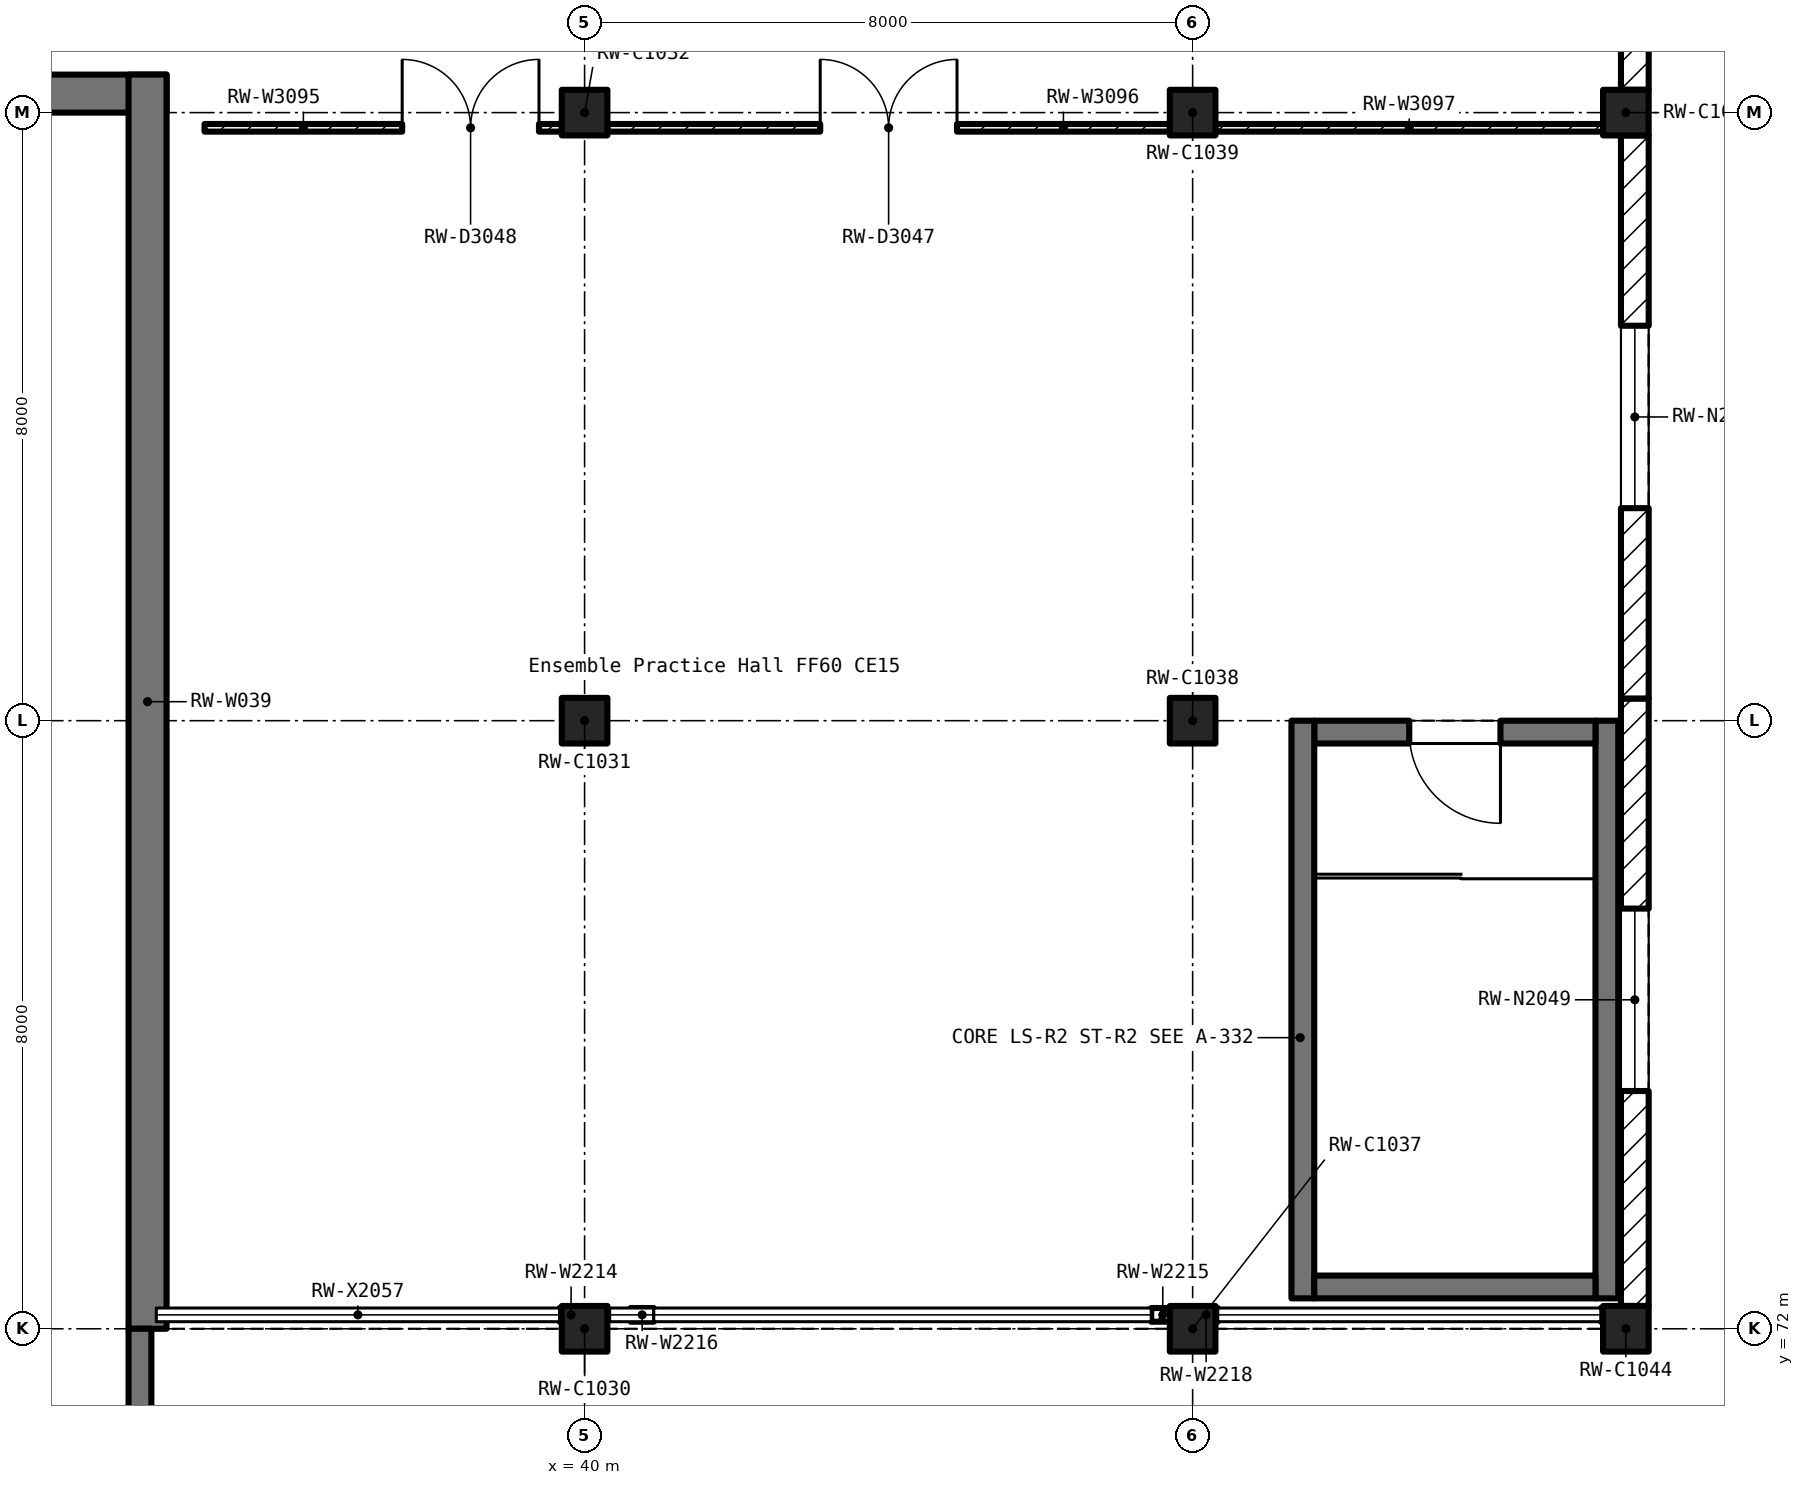
"""IFC4 building model, lengths in metres.
Left out: names, types, materials, properties, quantities, classifications, styles, units other than length and angle.
Written with IfcOpenShell. Run it as: python <this file> out.ifc"""

import sys

from ifc_helpers import new_model, si_unit, direction, frame, frame_2d, origin, origin_2d, place, context, subcontext, project, spatial, polyline, rectangle, outline, extrude, element, fill, save


model = new_model("IFC4")
c1 = context("Model", 3, precision=1e-05, world=origin(), true_north=direction((0.0, 1.0)))
c2 = subcontext(c1, "Body", "Model", "MODEL_VIEW")
j1 = project(units=[si_unit("LENGTHUNIT", "METRE"), si_unit("PLANEANGLEUNIT", "RADIAN")], contexts=[c1])
p1 = place(None, origin())
s1 = spatial("IfcSite", under=j1, at=p1, CompositionType="ELEMENT")
p2 = place(p1, origin())
s2 = spatial("IfcBuilding", under=s1, at=p2, CompositionType="ELEMENT")
p3 = place(p2, frame((0.0, 0.0, 22.5)))
s3 = spatial("IfcBuildingStorey", under=s2, at=p3, CompositionType="ELEMENT", Elevation=22.5)
for number, where, z_axis, x_axis in (
    (1, (40.0, 72.0, 0.0), (0.0, 0.0, 1.0), (1.0, 0.0, 0.0)),
    (2, (40.0, 80.0, 0.0), (0.0, 0.0, 1.0), (1.0, 0.0, 0.0)),
    (3, (40.0, 88.0, 0.0), (0.0, 0.0, 1.0), (1.0, 0.0, 0.0)),
    (4, (48.0, 72.0, 0.0), (0.0, 0.0, 1.0), (1.0, 0.0, 0.0)),
    (5, (48.0, 80.0, 0.0), (0.0, 0.0, 1.0), (1.0, 0.0, 0.0)),
    (6, (48.0, 88.0, 0.0), (0.0, 0.0, 1.0), (1.0, 0.0, 0.0)),
    (7, (53.7, 72.0, 0.0), (0.0, 0.0, 1.0), (1.0, 0.0, 0.0)),
    (8, (53.7, 88.0, 0.0), (0.0, 0.0, 1.0), (1.0, 0.0, 0.0)),
):
    element("IfcColumn", number, at=place(p3, frame(where, z_axis=z_axis, x_axis=x_axis)), inside=s3, PredefinedType="COLUMN", context=c2, shape_type="SweptSolid", body=[
        extrude(rectangle(XDim=0.6, YDim=0.6, at=origin_2d()), origin(), (0.0, 0.0, 1.0), 5.5),
    ])
p4 = place(p3, frame((9.56, 88.25, 0.0), z_axis=(0.0, 0.0, 1.0), x_axis=(1.0, 0.0, 0.0)))
e9 = element("IfcWall", 9, at=p4, inside=s3, PredefinedType="SHEAR", context=c2, shape_type="SweptSolid", body=[
    extrude(rectangle(XDim=24.94, YDim=0.5, at=frame_2d((12.47, 0.0))), origin(), (0.0, 0.0, 1.0), 5.25),
])
p5 = place(p3, frame((34.25, 72.0, 0.0), z_axis=(0.0, 0.0, 1.0), x_axis=(0.0, 1.0, 0.0)))
e10 = element("IfcWall", 10, at=p5, inside=s3, PredefinedType="SHEAR", context=c2, shape_type="SweptSolid", body=[
    extrude(outline(polyline([(0.0, 0.0), (16.5, 0.0), (16.5, 5.25), (0.001, 5.25), (0.0, 0.0), (0.0, 0.0)])), frame((0.0, 0.25, 0.0), z_axis=(0.0, -1.0, 0.0), x_axis=(1.0, 0.0, 0.0)), (0.0, 0.0, 1.0), 0.5),
])
p6 = place(p3, frame((53.818, 72.3, 0.0), z_axis=(0.0, 0.0, 1.0), x_axis=(0.0, 1.0, 0.0)))
e11 = element("IfcWall", 11, at=p6, inside=s3, PredefinedType="SOLIDWALL", context=c2, shape_type="SweptSolid", body=[
    extrude(rectangle(XDim=7.992, YDim=0.365, at=frame_2d((3.996, 0.0))), origin(), (0.0, 0.0, 1.0), 4.45),
])
p7 = place(p6, frame((2.828, 0.0, 1.0)))
e12 = element("IfcOpeningElement", 12, at=p7, cuts=e11, PredefinedType="OPENING", context=c2, shape_type="SweptSolid", body=[
    extrude(rectangle(XDim=2.4, YDim=2.0, at=frame_2d((1.2, 1.0))), frame((0.0, 0.195, 0.0), z_axis=(0.0, -1.0, 0.0), x_axis=(1.0, 0.0, 0.0)), (0.0, 0.0, 1.0), 0.389),
])
p8 = place(p3, frame((53.818, 80.292, 0.0), z_axis=(0.0, 0.0, 1.0), x_axis=(0.0, 1.0, 0.0)))
e13 = element("IfcWall", 13, at=p8, inside=s3, PredefinedType="SOLIDWALL", context=c2, shape_type="SweptSolid", body=[
    extrude(rectangle(XDim=7.408, YDim=0.365, at=frame_2d((3.704, 0.0))), origin(), (0.0, 0.0, 1.0), 4.45),
])
p9 = place(p8, frame((2.504, 0.0, 1.0)))
e14 = element("IfcOpeningElement", 14, at=p9, cuts=e13, PredefinedType="OPENING", context=c2, shape_type="SweptSolid", body=[
    extrude(rectangle(XDim=2.4, YDim=2.0, at=frame_2d((1.2, 1.0))), frame((0.0, 0.195, 0.0), z_axis=(0.0, -1.0, 0.0), x_axis=(1.0, 0.0, 0.0)), (0.0, 0.0, 1.0), 0.389),
])
p10 = place(p3, frame((53.818, 88.3, 0.0), z_axis=(0.0, 0.0, 1.0), x_axis=(0.0, 1.0, 0.0)))
e15 = element("IfcWall", 15, at=p10, inside=s3, PredefinedType="SOLIDWALL", context=c2, shape_type="SweptSolid", body=[
    extrude(rectangle(XDim=7.4, YDim=0.365, at=frame_2d((3.7, 0.0))), origin(), (0.0, 0.0, 1.0), 4.45),
])
p11 = place(p10, frame((2.5, 0.0, 1.0)))
e16 = element("IfcOpeningElement", 16, at=p11, cuts=e15, PredefinedType="OPENING", context=c2, shape_type="SweptSolid", body=[
    extrude(rectangle(XDim=2.4, YDim=2.0, at=frame_2d((1.2, 1.0))), frame((0.0, 0.195, 0.0), z_axis=(0.0, -1.0, 0.0), x_axis=(1.0, 0.0, 0.0)), (0.0, 0.0, 1.0), 0.389),
])
p12 = place(p3, frame((53.85, 64.3, 0.0), z_axis=(0.0, 0.0, 1.0), x_axis=(0.0, 1.0, 0.0)))
e17 = element("IfcWall", 17, at=p12, inside=s3, PredefinedType="PARAPET", context=c2, shape_type="SweptSolid", body=[
    extrude(rectangle(XDim=7.68, YDim=0.3, at=frame_2d((3.84, 0.0))), origin(), (0.0, 0.0, 1.0), 1.1),
])
p13 = place(p3, frame((53.45, 72.4, 0.0), z_axis=(0.0, 0.0, 1.0), x_axis=(0.0, 1.0, 0.0)))
e18 = element("IfcWall", 18, at=p13, inside=s3, PredefinedType="SOLIDWALL", context=c2, shape_type="SweptSolid", body=[
    extrude(rectangle(XDim=7.6, YDim=0.3, at=frame_2d((3.8, 0.0))), origin(), (0.0, 0.0, 1.0), 5.25),
])
p14 = place(p3, frame((53.3, 79.85, 0.0), z_axis=(0.0, 0.0, 1.0), x_axis=(-1.0, 0.0, 0.0)))
e19 = element("IfcWall", 19, at=p14, inside=s3, PredefinedType="SOLIDWALL", context=c2, shape_type="SweptSolid", body=[
    extrude(rectangle(XDim=3.7, YDim=0.3, at=frame_2d((1.85, 0.0))), origin(), (0.0, 0.0, 1.0), 5.25),
])
p15 = place(p14, frame((1.25, 0.0, 0.0)))
e20 = element("IfcOpeningElement", 20, at=p15, cuts=e19, PredefinedType="OPENING", context=c2, shape_type="SweptSolid", body=[
    extrude(rectangle(XDim=1.2, YDim=2.1, at=frame_2d((0.6, 1.05))), frame((0.0, 0.162, 0.0), z_axis=(0.0, -1.0, 0.0), x_axis=(1.0, 0.0, 0.0)), (0.0, 0.0, 1.0), 0.324),
])
p16 = place(p3, frame((49.45, 80.0, 0.0), z_axis=(0.0, 0.0, 1.0), x_axis=(0.0, -1.0, 0.0)))
e21 = element("IfcWall", 21, at=p16, inside=s3, PredefinedType="SOLIDWALL", context=c2, shape_type="SweptSolid", body=[
    extrude(rectangle(XDim=7.6, YDim=0.3, at=frame_2d((3.8, 0.0))), origin(), (0.0, 0.0, 1.0), 5.25),
])
p17 = place(p3, frame((49.6, 72.55, 0.0), z_axis=(0.0, 0.0, 1.0), x_axis=(1.0, 0.0, 0.0)))
e22 = element("IfcWall", 22, at=p17, inside=s3, PredefinedType="SOLIDWALL", context=c2, shape_type="SweptSolid", body=[
    extrude(rectangle(XDim=3.7, YDim=0.3, at=frame_2d((1.85, 0.0))), origin(), (0.0, 0.0, 1.0), 5.25),
])
p18 = place(p3, frame((35.0, 87.8, 0.0), z_axis=(0.0, 0.0, 1.0), x_axis=(1.0, 0.0, 0.0)))
e23 = element("IfcWall", 23, at=p18, inside=s3, PredefinedType="PARTITIONING", context=c2, shape_type="SweptSolid", body=[
    extrude(rectangle(XDim=4.7, YDim=0.1, at=frame_2d((2.35, 0.0))), origin(), (0.0, 0.0, 1.0), 4.35),
])
p19 = place(p18, frame((2.6, 0.0, 0.0)))
e24 = element("IfcOpeningElement", 24, at=p19, cuts=e23, PredefinedType="OPENING", context=c2, shape_type="SweptSolid", body=[
    extrude(rectangle(XDim=1.8, YDim=2.1, at=frame_2d((0.9, 1.05))), frame((0.0, 0.062, 0.0), z_axis=(0.0, -1.0, 0.0), x_axis=(1.0, 0.0, 0.0)), (0.0, 0.0, 1.0), 0.124),
])
p20 = place(p3, frame((40.3, 87.8, 0.0), z_axis=(0.0, 0.0, 1.0), x_axis=(1.0, 0.0, 0.0)))
e25 = element("IfcWall", 25, at=p20, inside=s3, PredefinedType="PARTITIONING", context=c2, shape_type="SweptSolid", body=[
    extrude(rectangle(XDim=7.4, YDim=0.1, at=frame_2d((3.7, 0.0))), origin(), (0.0, 0.0, 1.0), 4.35),
])
p21 = place(p20, frame((2.8, 0.0, 0.0)))
e26 = element("IfcOpeningElement", 26, at=p21, cuts=e25, PredefinedType="OPENING", context=c2, shape_type="SweptSolid", body=[
    extrude(rectangle(XDim=1.8, YDim=2.1, at=frame_2d((0.9, 1.05))), frame((0.0, 0.062, 0.0), z_axis=(0.0, -1.0, 0.0), x_axis=(1.0, 0.0, 0.0)), (0.0, 0.0, 1.0), 0.124),
])
p22 = place(p3, frame((48.3, 87.8, 0.0), z_axis=(0.0, 0.0, 1.0), x_axis=(1.0, 0.0, 0.0)))
e27 = element("IfcWall", 27, at=p22, inside=s3, PredefinedType="PARTITIONING", context=c2, shape_type="SweptSolid", body=[
    extrude(rectangle(XDim=5.1, YDim=0.1, at=frame_2d((2.55, 0.0))), origin(), (0.0, 0.0, 1.0), 4.35),
])
p23 = place(p3, frame((39.67, 72.183, 0.0), z_axis=(0.0, 0.0, 1.0), x_axis=(1.0, 0.0, 0.0)))
e28 = element("IfcWall", 28, at=p23, inside=s3, PredefinedType="SOLIDWALL", context=c2, shape_type="SweptSolid", body=[
    extrude(rectangle(XDim=0.305, YDim=0.18, at=frame_2d((0.153, 0.0))), origin(), (0.0, 0.0, 1.0), 4.4),
])
for number, where, z_axis, x_axis in (
    (29, (47.455, 72.183, 0.0), (0.0, 0.0, 1.0), (1.0, 0.0, 0.0)),
    (30, (40.91, 72.183, 0.0), (0.0, 0.0, 1.0), (-1.0, 0.0, 0.0)),
    (31, (53.37, 72.183, 0.0), (0.0, 0.0, 1.0), (1.0, 0.0, 0.0)),
):
    element("IfcWall", number, at=place(p3, frame(where, z_axis=z_axis, x_axis=x_axis)), inside=s3, PredefinedType="SOLIDWALL", context=c2, shape_type="SweptSolid", body=[
        extrude(rectangle(XDim=0.305, YDim=0.18, at=frame_2d((0.152, 0.0))), origin(), (0.0, 0.0, 1.0), 3.6),
    ])
p24 = place(p3, frame((48.33, 72.183, 0.0), z_axis=(0.0, 0.0, 1.0), x_axis=(-1.0, 0.0, 0.0)))
e32 = element("IfcWall", 32, at=p24, inside=s3, PredefinedType="SOLIDWALL", context=c2, shape_type="SweptSolid", body=[
    extrude(rectangle(XDim=0.305, YDim=0.18, at=frame_2d((0.153, 0.0))), origin(), (0.0, 0.0, 1.0), 3.6),
])
p25 = place(p3, frame((34.15, 65.7, 0.0), z_axis=(0.0, 0.0, 1.0), x_axis=(0.0, 1.0, 0.0)))
e33 = element("IfcWall", 33, at=p25, inside=s3, PredefinedType="SHEAR", context=c2, shape_type="SweptSolid", body=[
    extrude(rectangle(XDim=6.3, YDim=0.3, at=frame_2d((3.15, 0.0))), origin(), (0.0, 0.0, 1.0), 5.5),
])
p26 = place(p7, origin())
e34 = element("IfcWindow", 34, at=p26, inside=s3, PartitioningType="DOUBLE_PANEL_VERTICAL", PredefinedType="WINDOW", context=c2, shape_type="SweptSolid", body=[
    extrude(rectangle(XDim=2.4, YDim=2.0, at=frame_2d((1.2, 1.0))), frame((0.0, 0.03, 0.0), z_axis=(0.0, -1.0, 0.0), x_axis=(1.0, 0.0, 0.0)), (0.0, 0.0, 1.0), 0.06),
])
fill(e12, e34)
p27 = place(p9, origin())
e35 = element("IfcWindow", 35, at=p27, inside=s3, PartitioningType="DOUBLE_PANEL_VERTICAL", PredefinedType="WINDOW", context=c2, shape_type="SweptSolid", body=[
    extrude(rectangle(XDim=2.4, YDim=2.0, at=frame_2d((1.2, 1.0))), frame((0.0, 0.03, 0.0), z_axis=(0.0, -1.0, 0.0), x_axis=(1.0, 0.0, 0.0)), (0.0, 0.0, 1.0), 0.06),
])
fill(e14, e35)
p28 = place(p15, origin())
e36 = element("IfcDoor", 36, at=p28, inside=s3, OperationType="SINGLE_SWING_LEFT", PredefinedType="DOOR", context=c2, shape_type="SweptSolid", body=[
    extrude(rectangle(XDim=1.2, YDim=2.1, at=frame_2d((0.6, 1.05))), frame((0.0, 0.025, 0.0), z_axis=(0.0, -1.0, 0.0), x_axis=(1.0, 0.0, 0.0)), (0.0, 0.0, 1.0), 0.05),
])
fill(e20, e36)
p29 = place(p21, origin())
e37 = element("IfcDoor", 37, at=p29, inside=s3, OperationType="DOUBLE_DOOR_SINGLE_SWING", PredefinedType="DOOR", context=c2, shape_type="SweptSolid", body=[
    extrude(rectangle(XDim=1.8, YDim=2.1, at=frame_2d((0.9, 1.05))), frame((0.0, 0.025, 0.0), z_axis=(0.0, -1.0, 0.0), x_axis=(1.0, 0.0, 0.0)), (0.0, 0.0, 1.0), 0.05),
])
fill(e26, e37)
p30 = place(p19, origin())
e38 = element("IfcDoor", 38, at=p30, inside=s3, OperationType="DOUBLE_DOOR_SINGLE_SWING", PredefinedType="DOOR", context=c2, shape_type="SweptSolid", body=[
    extrude(rectangle(XDim=1.8, YDim=2.1, at=frame_2d((0.9, 1.05))), frame((0.0, 0.025, 0.0), z_axis=(0.0, -1.0, 0.0), x_axis=(1.0, 0.0, 0.0)), (0.0, 0.0, 1.0), 0.05),
])
fill(e24, e38)
save(model, sys.argv[1])
